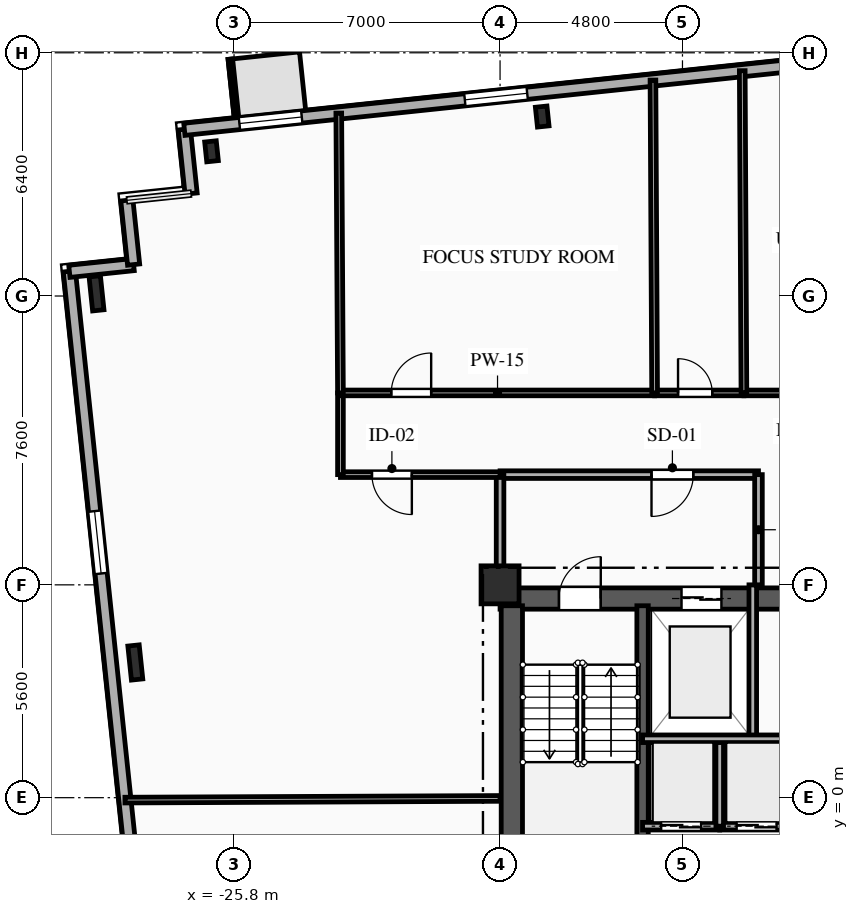
"""IFC4 building model, lengths in metres.
Left out: names, types, materials, properties, quantities, classifications, styles, units other than length and angle.
Written with IfcOpenShell. Run it as: python <this file> out.ifc"""

import sys

from ifc_helpers import new_model, si_unit, direction, frame, frame_2d, origin, origin_2d, place, context, subcontext, project, spatial, rectangle, i_section, extrude, element, fill, save


model = new_model("IFC4")
c1 = context("Model", 3, precision=1e-05, world=origin(), true_north=direction((0.0, 1.0)))
c2 = subcontext(c1, "Body", "Model", "MODEL_VIEW")
j1 = project(units=[si_unit("LENGTHUNIT", "METRE"), si_unit("PLANEANGLEUNIT", "RADIAN")], contexts=[c1])
p1 = place(None, origin())
s1 = spatial("IfcSite", under=j1, at=p1, CompositionType="ELEMENT")
p2 = place(p1, origin())
s2 = spatial("IfcBuilding", under=s1, at=p2, CompositionType="ELEMENT")
p3 = place(p2, frame((0.0, 0.0, 119.2)))
s3 = spatial("IfcBuildingStorey", under=s2, at=p3, CompositionType="ELEMENT", Elevation=119.2)
p4 = place(p3, frame((-18.8, 5.6, 0.0), z_axis=(0.0, 0.0, 1.0), x_axis=(1.0, 0.0, 0.0)))
e1 = element("IfcColumn", 1, at=p4, inside=s3, PredefinedType="COLUMN", context=c2, shape_type="SweptSolid", body=[
    extrude(rectangle(XDim=1.0, YDim=1.0, at=origin_2d()), origin(), (0.0, 0.0, 1.0), 3.35),
])
for number, where, z_axis, x_axis in (
    (2, (-17.691, 17.922, 0.0), (0.0, 0.0, 1.0), (0.995, 0.105, 0.0)),
    (3, (-26.393, 17.007, 0.0), (0.0, 0.0, 1.0), (0.995, 0.105, 0.0)),
):
    element("IfcColumn", number, at=place(p3, frame(where, z_axis=z_axis, x_axis=x_axis)), inside=s3, PredefinedType="COLUMN", context=c2, shape_type="SweptSolid", body=[
        extrude(i_section(OverallWidth=0.306, OverallDepth=0.524, WebThickness=0.021, FlangeThickness=0.04, FilletRadius=0.027, at=origin_2d()), origin(), (0.0, 0.0, 1.0), 3.35),
    ])
for number, where, z_axis, x_axis in (
    (4, (-29.419, 13.271, 0.0), (0.0, 0.0, 1.0), (0.995, 0.105, 0.0)),
    (5, (-28.398, 3.557, 0.0), (0.0, 0.0, 1.0), (0.995, 0.105, 0.0)),
):
    element("IfcColumn", number, at=place(p3, frame(where, z_axis=z_axis, x_axis=x_axis)), inside=s3, PredefinedType="COLUMN", context=c2, shape_type="SweptSolid", body=[
        extrude(i_section(OverallWidth=0.3, OverallDepth=0.9, WebThickness=0.019, FlangeThickness=0.035, FilletRadius=0.03, at=origin_2d()), origin(), (0.0, 0.0, 1.0), 3.35),
    ])
p5 = place(p3, frame((-26.935, -16.583, 0.0), z_axis=(0.0, 0.0, 1.0), x_axis=(-0.104524887486, 0.994522271192, 0.0)))
e6 = element("IfcWall", 6, at=p5, inside=s3, PredefinedType="SOLIDWALL", context=c2, shape_type="SweptSolid", body=[
    extrude(rectangle(XDim=30.6, YDim=0.32, at=frame_2d((15.3, 0.0))), origin(), (0.0, 0.0, 1.0), 3.045),
])
p6 = place(p5, frame((7.746, 0.0, 0.85)))
e7 = element("IfcOpeningElement", 7, at=p6, cuts=e6, PredefinedType="OPENING", context=c2, shape_type="SweptSolid", body=[
    extrude(rectangle(XDim=1.65, YDim=1.85, at=frame_2d((0.825, 0.925))), frame((0.0, 0.17, 0.0), z_axis=(0.0, -1.0, 0.0), x_axis=(1.0, 0.0, 0.0)), (0.0, 0.0, 1.0), 0.34),
])
p7 = place(p5, frame((22.606, 0.0, 0.85)))
e8 = element("IfcOpeningElement", 8, at=p7, cuts=e6, PredefinedType="OPENING", context=c2, shape_type="SweptSolid", body=[
    extrude(rectangle(XDim=1.65, YDim=1.85, at=frame_2d((0.825, 0.925))), frame((0.0, 0.17, 0.0), z_axis=(0.0, -1.0, 0.0), x_axis=(1.0, 0.0, 0.0)), (0.0, 0.0, 1.0), 0.34),
])
for number, where, z_axis, x_axis in (
    (9, (-30.133, 13.849, 0.0), (0.0, 0.0, 1.0), (0.995, 0.104, 0.0)),
    (10, (-28.443, 14.027, 0.0), (0.0, 0.0, 1.0), (-0.105, 0.995, 0.0)),
    (11, (-26.93, 15.895, 0.0), (0.0, 0.0, 1.0), (-0.105, 0.995, 0.0)),
):
    element("IfcWall", number, at=place(p3, frame(where, z_axis=z_axis, x_axis=x_axis)), inside=s3, PredefinedType="SOLIDWALL", context=c2, shape_type="SweptSolid", body=[
        extrude(rectangle(XDim=1.7, YDim=0.32, at=frame_2d((0.85, 0.0))), origin(), (0.0, 0.0, 1.0), 3.045),
    ])
p8 = place(p3, frame((-27.107, 17.586, 0.0), z_axis=(0.0, 0.0, 1.0), x_axis=(0.994521628355, 0.104531003701, 0.0)))
e12 = element("IfcWall", 12, at=p8, inside=s3, PredefinedType="SOLIDWALL", context=c2, shape_type="SweptSolid", body=[
    extrude(rectangle(XDim=53.8, YDim=0.32, at=frame_2d((26.9, 0.0))), origin(), (0.0, 0.0, 1.0), 3.045),
])
p9 = place(p8, frame((1.457, 0.0, 0.85)))
e13 = element("IfcOpeningElement", 13, at=p9, cuts=e12, PredefinedType="OPENING", context=c2, shape_type="SweptSolid", body=[
    extrude(rectangle(XDim=1.65, YDim=1.85, at=frame_2d((0.825, 0.925))), frame((0.0, 0.17, 0.0), z_axis=(0.0, -1.0, 0.0), x_axis=(1.0, 0.0, 0.0)), (0.0, 0.0, 1.0), 0.34),
])
p10 = place(p8, frame((7.421, 0.0, 0.85)))
e14 = element("IfcOpeningElement", 14, at=p10, cuts=e12, PredefinedType="OPENING", context=c2, shape_type="SweptSolid", body=[
    extrude(rectangle(XDim=1.65, YDim=1.85, at=frame_2d((0.825, 0.925))), frame((0.0, 0.17, 0.0), z_axis=(0.0, -1.0, 0.0), x_axis=(1.0, 0.0, 0.0)), (0.0, 0.0, 1.0), 0.34),
])
p11 = place(p8, frame((16.693, 0.0, 0.85)))
e15 = element("IfcOpeningElement", 15, at=p11, cuts=e12, PredefinedType="OPENING", context=c2, shape_type="SweptSolid", body=[
    extrude(rectangle(XDim=1.6, YDim=1.85, at=frame_2d((0.8, 0.925))), frame((0.0, 0.17, 0.0), z_axis=(0.0, -1.0, 0.0), x_axis=(1.0, 0.0, 0.0)), (0.0, 0.0, 1.0), 0.34),
])
p12 = place(p8, frame((22.918, 0.0, 0.85)))
e16 = element("IfcOpeningElement", 16, at=p12, cuts=e12, PredefinedType="OPENING", context=c2, shape_type="SweptSolid", body=[
    extrude(rectangle(XDim=2.2, YDim=1.85, at=frame_2d((1.1, 0.925))), frame((0.0, 0.17, 0.0), z_axis=(0.0, -1.0, 0.0), x_axis=(1.0, 0.0, 0.0)), (0.0, 0.0, 1.0), 0.34),
])
p13 = place(p8, frame((30.604, 0.0, 0.85)))
e17 = element("IfcOpeningElement", 17, at=p13, cuts=e12, PredefinedType="OPENING", context=c2, shape_type="SweptSolid", body=[
    extrude(rectangle(XDim=2.2, YDim=1.85, at=frame_2d((1.1, 0.925))), frame((0.0, 0.17, 0.0), z_axis=(0.0, -1.0, 0.0), x_axis=(1.0, 0.0, 0.0)), (0.0, 0.0, 1.0), 0.34),
])
p14 = place(p8, frame((38.289, 0.0, 0.85)))
e18 = element("IfcOpeningElement", 18, at=p14, cuts=e12, PredefinedType="OPENING", context=c2, shape_type="SweptSolid", body=[
    extrude(rectangle(XDim=2.2, YDim=1.85, at=frame_2d((1.1, 0.925))), frame((0.0, 0.17, 0.0), z_axis=(0.0, -1.0, 0.0), x_axis=(1.0, 0.0, 0.0)), (0.0, 0.0, 1.0), 0.34),
])
p15 = place(p8, frame((44.208, 0.0, 0.85)))
e19 = element("IfcOpeningElement", 19, at=p15, cuts=e12, PredefinedType="OPENING", context=c2, shape_type="SweptSolid", body=[
    extrude(rectangle(XDim=1.65, YDim=1.85, at=frame_2d((0.825, 0.925))), frame((0.0, 0.17, 0.0), z_axis=(0.0, -1.0, 0.0), x_axis=(1.0, 0.0, 0.0)), (0.0, 0.0, 1.0), 0.34),
])
p16 = place(p8, frame((47.771, 0.0, 0.85)))
e20 = element("IfcOpeningElement", 20, at=p16, cuts=e12, PredefinedType="OPENING", context=c2, shape_type="SweptSolid", body=[
    extrude(rectangle(XDim=1.65, YDim=1.85, at=frame_2d((0.825, 0.925))), frame((0.0, 0.17, 0.0), z_axis=(0.0, -1.0, 0.0), x_axis=(1.0, 0.0, 0.0)), (0.0, 0.0, 1.0), 0.34),
])
p17 = place(p8, frame((51.079, 0.0, 0.85)))
e21 = element("IfcOpeningElement", 21, at=p17, cuts=e12, PredefinedType="OPENING", context=c2, shape_type="SweptSolid", body=[
    extrude(rectangle(XDim=1.6, YDim=1.85, at=frame_2d((0.8, 0.925))), frame((0.0, 0.17, 0.0), z_axis=(0.0, -1.0, 0.0), x_axis=(1.0, 0.0, 0.0)), (0.0, 0.0, 1.0), 0.34),
])
p18 = place(p3, frame((-18.8, 5.24, 0.0), z_axis=(0.0, 0.0, 1.0), x_axis=(1.0, 0.0, 0.0)))
e22 = element("IfcWall", 22, at=p18, inside=s3, PredefinedType="SHEAR", context=c2, shape_type="SweptSolid", body=[
    extrude(rectangle(XDim=9.6, YDim=0.56, at=frame_2d((4.8, 0.0))), origin(), (0.0, 0.0, 1.0), 3.045),
])
p19 = place(p18, frame((1.55, 0.0, 0.0)))
e23 = element("IfcOpeningElement", 23, at=p19, cuts=e22, PredefinedType="OPENING", context=c2, shape_type="SweptSolid", body=[
    extrude(rectangle(XDim=1.1, YDim=2.15, at=frame_2d((0.55, 1.075))), frame((0.0, 0.29, 0.0), z_axis=(0.0, -1.0, 0.0), x_axis=(1.0, 0.0, 0.0)), (0.0, 0.0, 1.0), 0.58),
])
p20 = place(p18, frame((4.775, 0.0, 0.0)))
e24 = element("IfcOpeningElement", 24, at=p20, cuts=e22, PredefinedType="OPENING", context=c2, shape_type="SweptSolid", body=[
    extrude(rectangle(XDim=1.05, YDim=2.1, at=frame_2d((0.525, 1.05))), frame((0.0, 0.29, 0.0), z_axis=(0.0, -1.0, 0.0), x_axis=(1.0, 0.0, 0.0)), (0.0, 0.0, 1.0), 0.58),
])
p21 = place(p3, frame((-18.49, -5.05, 0.0), z_axis=(0.0, 0.0, 1.0), x_axis=(0.0, 1.0, 0.0)))
e25 = element("IfcWall", 25, at=p21, inside=s3, PredefinedType="SHEAR", context=c2, shape_type="SweptSolid", body=[
    extrude(rectangle(XDim=10.1, YDim=0.56, at=frame_2d((5.05, 0.0))), origin(), (0.0, 0.0, 1.0), 3.045),
])
p22 = place(p3, frame((-15.05, -5.05, 0.0), z_axis=(0.0, 0.0, 1.0), x_axis=(0.0, 1.0, 0.0)))
e26 = element("IfcWall", 26, at=p22, inside=s3, PredefinedType="SHEAR", context=c2, shape_type="SweptSolid", body=[
    extrude(rectangle(XDim=10.1, YDim=0.3, at=frame_2d((5.05, 0.0))), origin(), (0.0, 0.0, 1.0), 3.045),
])
p23 = place(p3, frame((-12.15, 1.55, 0.0), z_axis=(0.0, 0.0, 1.0), x_axis=(0.0, 1.0, 0.0)))
e27 = element("IfcWall", 27, at=p23, inside=s3, PredefinedType="PARTITIONING", context=c2, shape_type="SweptSolid", body=[
    extrude(rectangle(XDim=4.05, YDim=0.2, at=frame_2d((2.025, 0.0))), origin(), (0.0, 0.0, 1.0), 3.045),
])
p24 = place(p3, frame((-12.0, 8.5, 0.0), z_axis=(0.0, 0.0, 1.0), x_axis=(-1.0, 0.0, 0.0)))
e28 = element("IfcWall", 28, at=p24, inside=s3, PredefinedType="PARTITIONING", context=c2, shape_type="SweptSolid", body=[
    extrude(rectangle(XDim=6.8, YDim=0.2, at=frame_2d((3.4, 0.0))), origin(), (0.0, 0.0, 1.0), 3.045),
])
p25 = place(p24, frame((1.715, 0.0, 0.0)))
e29 = element("IfcOpeningElement", 29, at=p25, cuts=e28, PredefinedType="OPENING", context=c2, shape_type="SweptSolid", body=[
    extrude(rectangle(XDim=1.1, YDim=2.15, at=frame_2d((0.55, 1.075))), frame((0.0, 0.11, 0.0), z_axis=(0.0, -1.0, 0.0), x_axis=(1.0, 0.0, 0.0)), (0.0, 0.0, 1.0), 0.22),
])
p26 = place(p3, frame((-12.0, 5.6, 0.0), z_axis=(0.0, 0.0, 1.0), x_axis=(0.0, 1.0, 0.0)))
e30 = element("IfcWall", 30, at=p26, inside=s3, PredefinedType="PARTITIONING", context=c2, shape_type="SweptSolid", body=[
    extrude(rectangle(XDim=2.9, YDim=0.2, at=frame_2d((1.45, 0.0))), origin(), (0.0, 0.0, 1.0), 3.045),
])
p27 = place(p3, frame((-18.8, 8.5, 0.0), z_axis=(0.0, 0.0, 1.0), x_axis=(0.0, -1.0, 0.0)))
e31 = element("IfcWall", 31, at=p27, inside=s3, PredefinedType="PARTITIONING", context=c2, shape_type="SweptSolid", body=[
    extrude(rectangle(XDim=2.9, YDim=0.2, at=frame_2d((1.45, 0.0))), origin(), (0.0, 0.0, 1.0), 2.53),
])
p28 = place(p3, frame((-13.02, -0.75, 0.0), z_axis=(0.0, 0.0, 1.0), x_axis=(-1.0, 0.0, 0.0)))
e32 = element("IfcWall", 32, at=p28, inside=s3, PredefinedType="PARTITIONING", context=c2, shape_type="SweptSolid", body=[
    extrude(rectangle(XDim=2.03, YDim=0.2, at=frame_2d((1.015, 0.0))), origin(), (0.0, 0.0, 1.0), 3.045),
])
p29 = place(p28, frame((0.49, 0.0, 0.0)))
e33 = element("IfcOpeningElement", 33, at=p29, cuts=e32, PredefinedType="OPENING", context=c2, shape_type="SweptSolid", body=[
    extrude(rectangle(XDim=1.05, YDim=2.1, at=frame_2d((0.525, 1.05))), frame((0.0, 0.11, 0.0), z_axis=(0.0, -1.0, 0.0), x_axis=(1.0, 0.0, 0.0)), (0.0, 0.0, 1.0), 0.22),
])
p30 = place(p3, frame((-11.08, -0.75, 0.0), z_axis=(0.0, 0.0, 1.0), x_axis=(-1.0, 0.0, 0.0)))
e34 = element("IfcWall", 34, at=p30, inside=s3, PredefinedType="PARTITIONING", context=c2, shape_type="SweptSolid", body=[
    extrude(rectangle(XDim=1.94, YDim=0.2, at=frame_2d((0.97, 0.0))), origin(), (0.0, 0.0, 1.0), 3.045),
])
p31 = place(p30, frame((0.445, 0.0, 0.0)))
e35 = element("IfcOpeningElement", 35, at=p31, cuts=e34, PredefinedType="OPENING", context=c2, shape_type="SweptSolid", body=[
    extrude(rectangle(XDim=1.05, YDim=2.1, at=frame_2d((0.525, 1.05))), frame((0.0, 0.11, 0.0), z_axis=(0.0, -1.0, 0.0), x_axis=(1.0, 0.0, 0.0)), (0.0, 0.0, 1.0), 0.22),
])
p32 = place(p3, frame((-13.02, -0.75, 0.0), z_axis=(0.0, 0.0, 1.0), x_axis=(0.0, 1.0, 0.0)))
e36 = element("IfcWall", 36, at=p32, inside=s3, PredefinedType="PARTITIONING", context=c2, shape_type="SweptSolid", body=[
    extrude(rectangle(XDim=2.3, YDim=0.2, at=frame_2d((1.15, 0.0))), origin(), (0.0, 0.0, 1.0), 3.045),
])
p33 = place(p3, frame((-18.8, 8.5, 0.0), z_axis=(0.0, 0.0, 1.0), x_axis=(-1.0, 0.0, 0.0)))
e37 = element("IfcWall", 37, at=p33, inside=s3, PredefinedType="PARTITIONING", context=c2, shape_type="SweptSolid", body=[
    extrude(rectangle(XDim=4.2, YDim=0.15, at=frame_2d((2.1, 0.0))), origin(), (0.0, 0.0, 1.0), 3.045),
])
p34 = place(p33, frame((2.321, 0.0, 0.0)))
e38 = element("IfcOpeningElement", 38, at=p34, cuts=e37, PredefinedType="OPENING", context=c2, shape_type="SweptSolid", body=[
    extrude(rectangle(XDim=1.05, YDim=2.15, at=frame_2d((0.525, 1.075))), frame((0.0, 0.085, 0.0), z_axis=(0.0, -1.0, 0.0), x_axis=(1.0, 0.0, 0.0)), (0.0, 0.0, 1.0), 0.17),
])
p35 = place(p3, frame((-23.0, 8.5, 0.0), z_axis=(0.0, 0.0, 1.0), x_axis=(0.0, 1.0, 0.0)))
e39 = element("IfcWall", 39, at=p35, inside=s3, PredefinedType="PARTITIONING", context=c2, shape_type="SweptSolid", body=[
    extrude(rectangle(XDim=2.15, YDim=0.15, at=frame_2d((1.075, 0.0))), origin(), (0.0, 0.0, 1.0), 3.045),
])
p36 = place(p3, frame((-23.0, 10.65, 0.0), z_axis=(0.0, 0.0, 1.0), x_axis=(1.0, 0.0, 0.0)))
e40 = element("IfcWall", 40, at=p36, inside=s3, PredefinedType="PARTITIONING", context=c2, shape_type="SweptSolid", body=[
    extrude(rectangle(XDim=8.267, YDim=0.15, at=frame_2d((4.134, 0.0))), origin(), (0.0, 0.0, 1.0), 3.045),
])
p37 = place(p36, frame((1.337, 0.0, 0.0)))
e41 = element("IfcOpeningElement", 41, at=p37, cuts=e40, PredefinedType="OPENING", context=c2, shape_type="SweptSolid", body=[
    extrude(rectangle(XDim=1.05, YDim=2.15, at=frame_2d((0.525, 1.075))), frame((0.0, 0.085, 0.0), z_axis=(0.0, -1.0, 0.0), x_axis=(1.0, 0.0, 0.0)), (0.0, 0.0, 1.0), 0.17),
])
p38 = place(p3, frame((-14.733, 10.65, 0.0), z_axis=(0.0, 0.0, 1.0), x_axis=(1.0, 0.0, 0.0)))
e42 = element("IfcWall", 42, at=p38, inside=s3, PredefinedType="PLUMBINGWALL", context=c2, shape_type="SweptSolid", body=[
    extrude(rectangle(XDim=2.35, YDim=0.15, at=frame_2d((1.175, 0.0))), origin(), (0.0, 0.0, 1.0), 3.045),
])
p39 = place(p38, frame((0.616, 0.0, 0.0)))
e43 = element("IfcOpeningElement", 43, at=p39, cuts=e42, PredefinedType="OPENING", context=c2, shape_type="SweptSolid", body=[
    extrude(rectangle(XDim=0.9, YDim=2.1, at=frame_2d((0.45, 1.05))), frame((0.0, 0.085, 0.0), z_axis=(0.0, -1.0, 0.0), x_axis=(1.0, 0.0, 0.0)), (0.0, 0.0, 1.0), 0.17),
])
p40 = place(p3, frame((-12.383, 10.65, 0.0), z_axis=(0.0, 0.0, 1.0), x_axis=(1.0, 0.0, 0.0)))
e44 = element("IfcWall", 44, at=p40, inside=s3, PredefinedType="PARTITIONING", context=c2, shape_type="SweptSolid", body=[
    extrude(rectangle(XDim=5.316, YDim=0.15, at=frame_2d((2.658, 0.0))), origin(), (0.0, 0.0, 1.0), 3.045),
])
p41 = place(p40, frame((0.981, 0.0, 0.0)))
e45 = element("IfcOpeningElement", 45, at=p41, cuts=e44, PredefinedType="OPENING", context=c2, shape_type="SweptSolid", body=[
    extrude(rectangle(XDim=0.95, YDim=2.1, at=frame_2d((0.475, 1.05))), frame((0.0, 0.085, 0.0), z_axis=(0.0, -1.0, 0.0), x_axis=(1.0, 0.0, 0.0)), (0.0, 0.0, 1.0), 0.17),
])
p42 = place(p3, frame((-28.671, -0.064, 0.0), z_axis=(0.0, 0.0, 1.0), x_axis=(0.999990089865, 0.004451985263, 0.0)))
e46 = element("IfcWall", 46, at=p42, inside=s3, PredefinedType="PARTITIONING", context=c2, shape_type="SweptSolid", body=[
    extrude(rectangle(XDim=9.871, YDim=0.15, at=frame_2d((4.936, 0.0))), origin(), (0.0, 0.0, 1.0), 3.045),
])
p43 = place(p3, frame((-23.044, 18.013, 0.0), z_axis=(0.0, 0.0, 1.0), x_axis=(0.005968459246, -0.999982188588, 0.0)))
e47 = element("IfcWall", 47, at=p43, inside=s3, PredefinedType="PARTITIONING", context=c2, shape_type="SweptSolid", body=[
    extrude(rectangle(XDim=7.363, YDim=0.15, at=frame_2d((3.682, 0.0))), origin(), (0.0, 0.0, 1.0), 3.045),
])
p44 = place(p3, frame((-14.777, 18.882, 0.0), z_axis=(0.0, 0.0, 1.0), x_axis=(0.005338477179, -0.999985750229, 0.0)))
e48 = element("IfcWall", 48, at=p44, inside=s3, PredefinedType="PLUMBINGWALL", context=c2, shape_type="SweptSolid", body=[
    extrude(rectangle(XDim=8.232, YDim=0.15, at=frame_2d((4.116, 0.0))), origin(), (0.0, 0.0, 1.0), 3.045),
])
p45 = place(p3, frame((-12.427, 19.129, 0.0), z_axis=(0.0, 0.0, 1.0), x_axis=(0.005182918666, -0.999986568587, 0.0)))
e49 = element("IfcWall", 49, at=p45, inside=s3, PredefinedType="PLUMBINGWALL", context=c2, shape_type="SweptSolid", body=[
    extrude(rectangle(XDim=8.479, YDim=0.15, at=frame_2d((4.239, 0.0))), origin(), (0.0, 0.0, 1.0), 3.045),
])
p46 = place(p3, frame((-15.05, 1.55, 0.0), z_axis=(0.0, 0.0, 1.0), x_axis=(1.0, 0.0, 0.0)))
e50 = element("IfcWall", 50, at=p46, inside=s3, PredefinedType="PARTITIONING", context=c2, shape_type="SweptSolid", body=[
    extrude(rectangle(XDim=5.85, YDim=0.2, at=frame_2d((2.925, 0.0))), origin(), (0.0, 0.0, 1.0), 3.045),
])
p47 = place(p7, origin())
e51 = element("IfcWindow", 51, at=p47, inside=s3, PartitioningType="SINGLE_PANEL", PredefinedType="WINDOW", context=c2, shape_type="SweptSolid", body=[
    extrude(rectangle(XDim=1.65, YDim=1.85, at=frame_2d((0.825, 0.925))), frame((0.0, 0.03, 0.0), z_axis=(0.0, -1.0, 0.0), x_axis=(1.0, 0.0, 0.0)), (0.0, 0.0, 1.0), 0.06),
])
fill(e8, e51)
p48 = place(p9, origin())
e52 = element("IfcWindow", 52, at=p48, inside=s3, PartitioningType="SINGLE_PANEL", PredefinedType="WINDOW", context=c2, shape_type="SweptSolid", body=[
    extrude(rectangle(XDim=1.65, YDim=1.85, at=frame_2d((0.825, 0.925))), frame((0.0, 0.03, 0.0), z_axis=(0.0, -1.0, 0.0), x_axis=(1.0, 0.0, 0.0)), (0.0, 0.0, 1.0), 0.06),
])
fill(e13, e52)
p49 = place(p10, origin())
e53 = element("IfcWindow", 53, at=p49, inside=s3, PartitioningType="SINGLE_PANEL", PredefinedType="WINDOW", context=c2, shape_type="SweptSolid", body=[
    extrude(rectangle(XDim=1.65, YDim=1.85, at=frame_2d((0.825, 0.925))), frame((0.0, 0.03, 0.0), z_axis=(0.0, -1.0, 0.0), x_axis=(1.0, 0.0, 0.0)), (0.0, 0.0, 1.0), 0.06),
])
fill(e14, e53)
p50 = place(p19, origin())
e54 = element("IfcDoor", 54, at=p50, inside=s3, OperationType="SINGLE_SWING_RIGHT", PredefinedType="DOOR", context=c2, shape_type="SweptSolid", body=[
    extrude(rectangle(XDim=1.1, YDim=2.15, at=frame_2d((0.55, 1.075))), frame((0.0, 0.025, 0.0), z_axis=(0.0, -1.0, 0.0), x_axis=(1.0, 0.0, 0.0)), (0.0, 0.0, 1.0), 0.05),
])
fill(e23, e54)
p51 = place(p20, origin())
e55 = element("IfcDoor", 55, at=p51, inside=s3, OperationType="DOUBLE_DOOR_SLIDING", PredefinedType="DOOR", context=c2, shape_type="SweptSolid", body=[
    extrude(rectangle(XDim=1.05, YDim=2.1, at=frame_2d((0.525, 1.05))), frame((0.0, 0.025, 0.0), z_axis=(0.0, -1.0, 0.0), x_axis=(1.0, 0.0, 0.0)), (0.0, 0.0, 1.0), 0.05),
])
fill(e24, e55)
p52 = place(p25, origin())
e56 = element("IfcDoor", 56, at=p52, inside=s3, OperationType="SINGLE_SWING_RIGHT", PredefinedType="DOOR", context=c2, shape_type="SweptSolid", body=[
    extrude(rectangle(XDim=1.1, YDim=2.15, at=frame_2d((0.55, 1.075))), frame((0.0, 0.025, 0.0), z_axis=(0.0, -1.0, 0.0), x_axis=(1.0, 0.0, 0.0)), (0.0, 0.0, 1.0), 0.05),
])
fill(e29, e56)
p53 = place(p29, origin())
e57 = element("IfcDoor", 57, at=p53, inside=s3, OperationType="DOUBLE_DOOR_SLIDING", PredefinedType="DOOR", context=c2, shape_type="SweptSolid", body=[
    extrude(rectangle(XDim=1.05, YDim=2.1, at=frame_2d((0.525, 1.05))), frame((0.0, 0.025, 0.0), z_axis=(0.0, -1.0, 0.0), x_axis=(1.0, 0.0, 0.0)), (0.0, 0.0, 1.0), 0.05),
])
fill(e33, e57)
p54 = place(p31, origin())
e58 = element("IfcDoor", 58, at=p54, inside=s3, OperationType="DOUBLE_DOOR_SLIDING", PredefinedType="DOOR", context=c2, shape_type="SweptSolid", body=[
    extrude(rectangle(XDim=1.05, YDim=2.1, at=frame_2d((0.525, 1.05))), frame((0.0, 0.025, 0.0), z_axis=(0.0, -1.0, 0.0), x_axis=(1.0, 0.0, 0.0)), (0.0, 0.0, 1.0), 0.05),
])
fill(e35, e58)
p55 = place(p34, origin())
e59 = element("IfcDoor", 59, at=p55, inside=s3, OperationType="SINGLE_SWING_LEFT", PredefinedType="DOOR", context=c2, shape_type="SweptSolid", body=[
    extrude(rectangle(XDim=1.05, YDim=2.15, at=frame_2d((0.525, 1.075))), frame((0.0, 0.025, 0.0), z_axis=(0.0, -1.0, 0.0), x_axis=(1.0, 0.0, 0.0)), (0.0, 0.0, 1.0), 0.05),
])
fill(e38, e59)
p56 = place(p37, origin())
e60 = element("IfcDoor", 60, at=p56, inside=s3, OperationType="SINGLE_SWING_RIGHT", PredefinedType="DOOR", context=c2, shape_type="SweptSolid", body=[
    extrude(rectangle(XDim=1.05, YDim=2.15, at=frame_2d((0.525, 1.075))), frame((0.0, 0.025, 0.0), z_axis=(0.0, -1.0, 0.0), x_axis=(1.0, 0.0, 0.0)), (0.0, 0.0, 1.0), 0.05),
])
fill(e41, e60)
p57 = place(p39, origin())
e61 = element("IfcDoor", 61, at=p57, inside=s3, OperationType="SINGLE_SWING_LEFT", PredefinedType="DOOR", context=c2, shape_type="SweptSolid", body=[
    extrude(rectangle(XDim=0.9, YDim=2.1, at=frame_2d((0.45, 1.05))), frame((0.0, 0.025, 0.0), z_axis=(0.0, -1.0, 0.0), x_axis=(1.0, 0.0, 0.0)), (0.0, 0.0, 1.0), 0.05),
])
fill(e43, e61)
save(model, sys.argv[1])
